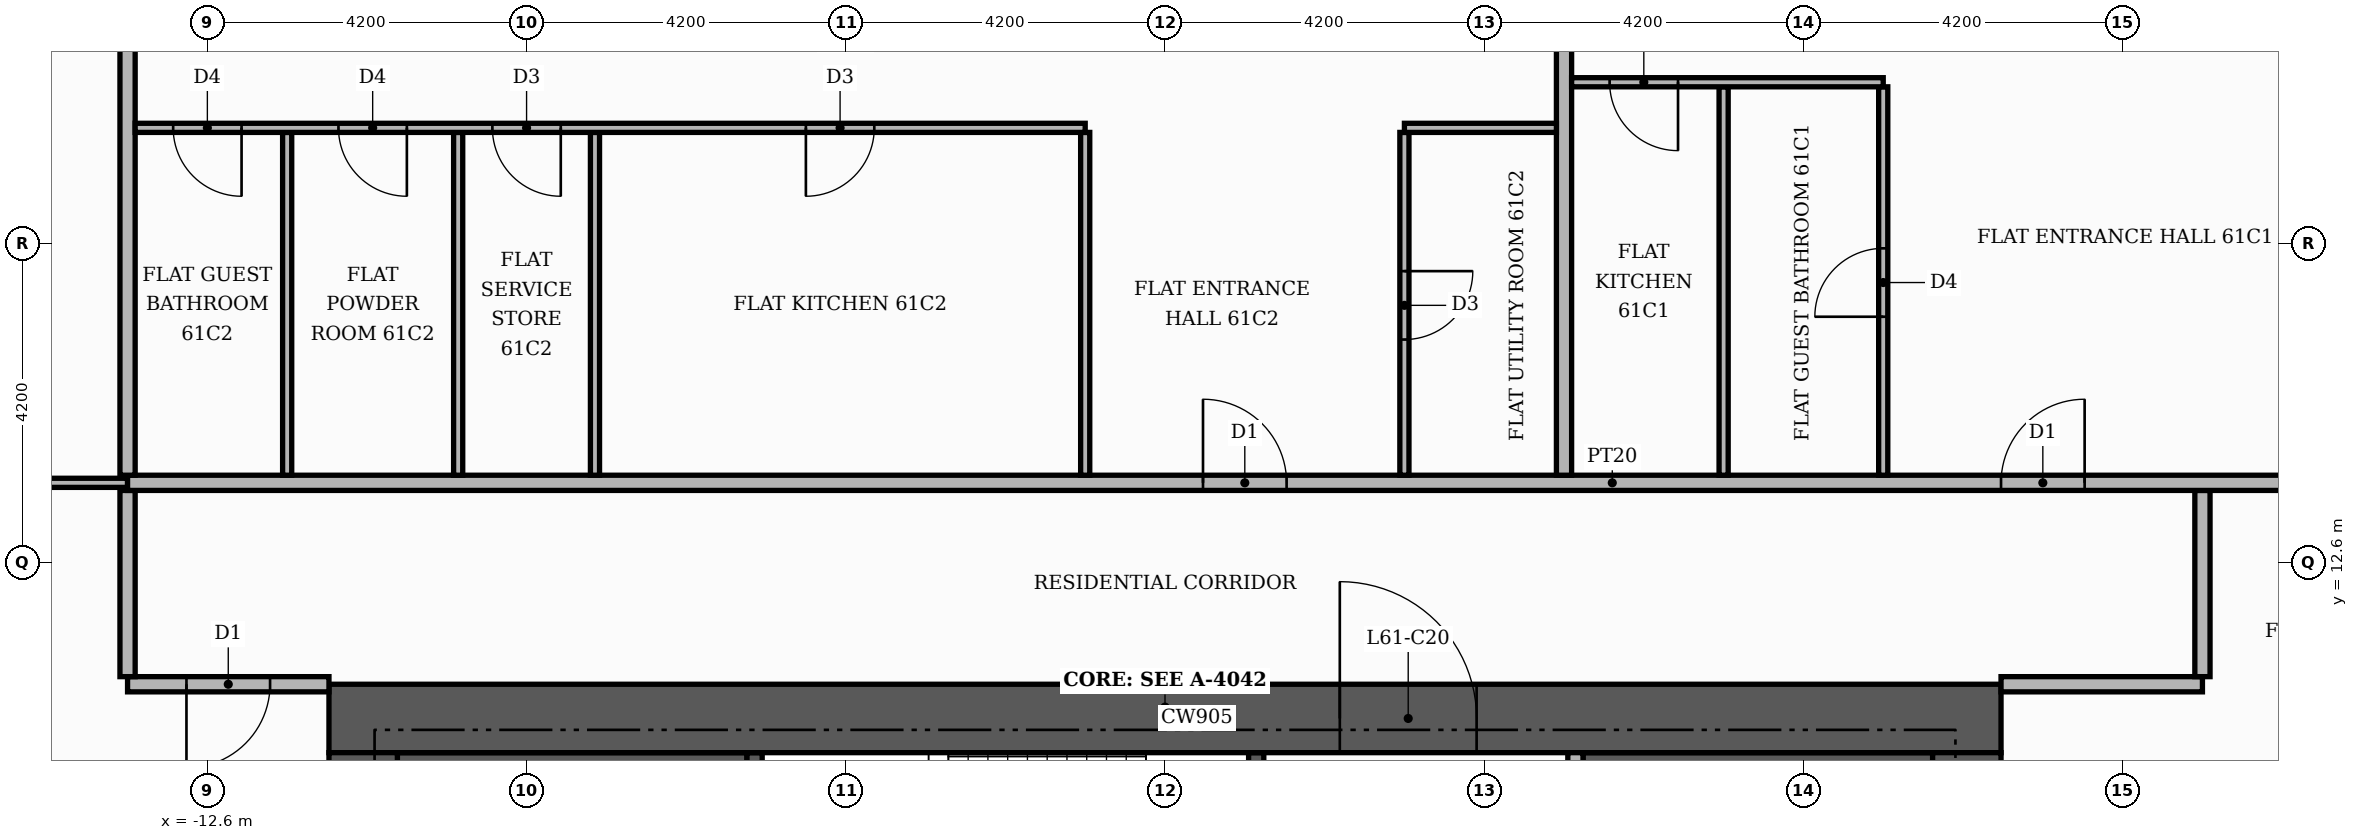
"""IFC4 building model, lengths in metres.
Left out: names, types, materials, properties, quantities, classifications, styles, units other than length and angle.
Written with IfcOpenShell. Run it as: python <this file> out.ifc"""

import sys

from ifc_helpers import new_model, si_unit, direction, frame, frame_2d, origin, place, context, subcontext, project, spatial, rectangle, extrude, element, fill, save


model = new_model("IFC4")
c1 = context("Model", 3, precision=1e-05, world=origin(), true_north=direction((0.0, 1.0)))
c2 = subcontext(c1, "Body", "Model", "MODEL_VIEW")
j1 = project(units=[si_unit("LENGTHUNIT", "METRE"), si_unit("PLANEANGLEUNIT", "RADIAN")], contexts=[c1])
p1 = place(None, origin())
s1 = spatial("IfcSite", under=j1, at=p1, CompositionType="ELEMENT")
p2 = place(p1, origin())
s2 = spatial("IfcBuilding", under=s1, at=p2, CompositionType="ELEMENT")
p3 = place(p2, frame((0.0, 0.0, 256.2)))
s3 = spatial("IfcBuildingStorey", under=s2, at=p3, CompositionType="ELEMENT", Elevation=256.2)
for number, where, z_axis, x_axis in (
    (1, (-10.1, 9.15, 0.0), (0.0, 0.0, 1.0), (1.0, 0.0, 0.0)),
    (2, (5.5, 9.15, 0.0), (0.0, 0.0, 1.0), (1.0, 0.0, 0.0)),
):
    element("IfcWall", number, at=place(p3, frame(where, z_axis=z_axis, x_axis=x_axis)), inside=s3, PredefinedType="SHEAR", context=c2, shape_type="SweptSolid", body=[
        extrude(rectangle(XDim=4.6, YDim=1.9, at=frame_2d((2.3, 0.0))), origin(), (0.0, 0.0, 1.0), 3.48),
    ])
p4 = place(p3, frame((-5.4, 7.25, 0.0), z_axis=(0.0, 0.0, 1.0), x_axis=(0.0, 1.0, 0.0)))
e3 = element("IfcWall", 3, at=p4, inside=s3, PredefinedType="SHEAR", context=c2, shape_type="SweptSolid", body=[
    extrude(rectangle(XDim=2.85, YDim=0.2, at=frame_2d((1.425, 0.0))), origin(), (0.0, 0.0, 1.0), 3.48),
])
p5 = place(p3, frame((1.2, 7.25, 0.0), z_axis=(0.0, 0.0, 1.0), x_axis=(0.0, 1.0, 0.0)))
e4 = element("IfcWall", 4, at=p5, inside=s3, PredefinedType="SHEAR", context=c2, shape_type="SweptSolid", body=[
    extrude(rectangle(XDim=2.85, YDim=0.2, at=frame_2d((1.425, 0.0))), origin(), (0.0, 0.0, 1.0), 3.48),
])
p6 = place(p5, frame((0.85, 0.0, 0.0)))
e5 = element("IfcOpeningElement", 5, at=p6, cuts=e4, PredefinedType="OPENING", context=c2, shape_type="SweptSolid", body=[
    extrude(rectangle(XDim=1.0, YDim=2.1, at=frame_2d((0.5, 1.05))), frame((0.0, 0.11, 0.0), z_axis=(0.0, -1.0, 0.0), x_axis=(1.0, 0.0, 0.0)), (0.0, 0.0, 1.0), 0.22),
])
p7 = place(p3, frame((-11.0, 10.55, 0.0), z_axis=(0.0, 0.0, 1.0), x_axis=(1.0, 0.0, 0.0)))
e6 = element("IfcWall", 6, at=p7, inside=s3, PredefinedType="SHEAR", context=c2, shape_type="SweptSolid", body=[
    extrude(rectangle(XDim=22.0, YDim=0.9, at=frame_2d((11.0, 0.0))), origin(), (0.0, 0.0, 1.0), 3.48),
])
p8 = place(p7, frame((13.3, 0.0, 0.0)))
e7 = element("IfcOpeningElement", 7, at=p8, cuts=e6, PredefinedType="OPENING", context=c2, shape_type="SweptSolid", body=[
    extrude(rectangle(XDim=1.8, YDim=2.2, at=frame_2d((0.9, 1.1))), frame((0.0, 0.46, 0.0), z_axis=(0.0, -1.0, 0.0), x_axis=(1.0, 0.0, 0.0)), (0.0, 0.0, 1.0), 0.92),
])
for number, where, z_axis, x_axis in (
    (8, (-10.55, -10.1, 0.0), (0.0, 0.0, 1.0), (0.0, 1.0, 0.0)),
    (9, (10.55, -10.1, 0.0), (0.0, 0.0, 1.0), (0.0, 1.0, 0.0)),
):
    element("IfcWall", number, at=place(p3, frame(where, z_axis=z_axis, x_axis=x_axis)), inside=s3, PredefinedType="SHEAR", context=c2, shape_type="SweptSolid", body=[
        extrude(rectangle(XDim=20.2, YDim=0.9, at=frame_2d((10.1, 0.0))), origin(), (0.0, 0.0, 1.0), 3.48),
    ])
p9 = place(p3, frame((5.4, 5.5, 0.0), z_axis=(0.0, 0.0, 1.0), x_axis=(0.0, 1.0, 0.0)))
e10 = element("IfcWall", 10, at=p9, inside=s3, PredefinedType="PARTITIONING", context=c2, shape_type="SweptSolid", body=[
    extrude(rectangle(XDim=4.6, YDim=0.2, at=frame_2d((2.3, 0.0))), origin(), (0.0, 0.0, 1.0), 3.48),
])
p10 = place(p9, frame((0.25, 0.0, 0.0)))
e11 = element("IfcOpeningElement", 11, at=p10, cuts=e10, PredefinedType="OPENING", context=c2, shape_type="SweptSolid", body=[
    extrude(rectangle(XDim=1.0, YDim=2.1, at=frame_2d((0.5, 1.05))), frame((0.0, 0.11, 0.0), z_axis=(0.0, -1.0, 0.0), x_axis=(1.0, 0.0, 0.0)), (0.0, 0.0, 1.0), 0.22),
])
p11 = place(p3, frame((-13.65, 11.0, 0.0), z_axis=(0.0, 0.0, 1.0), x_axis=(1.0, 0.0, 0.0)))
e12 = element("IfcWall", 12, at=p11, inside=s3, PredefinedType="PARTITIONING", context=c2, shape_type="SweptSolid", body=[
    extrude(rectangle(XDim=2.65, YDim=0.2, at=frame_2d((1.325, 0.0))), origin(), (0.0, 0.0, 1.0), 3.48),
])
p12 = place(p11, frame((0.775, 0.0, 0.0)))
e13 = element("IfcOpeningElement", 13, at=p12, cuts=e12, PredefinedType="OPENING", context=c2, shape_type="SweptSolid", body=[
    extrude(rectangle(XDim=1.1, YDim=2.4, at=frame_2d((0.55, 1.2))), frame((0.0, 0.11, 0.0), z_axis=(0.0, -1.0, 0.0), x_axis=(1.0, 0.0, 0.0)), (0.0, 0.0, 1.0), 0.22),
])
p13 = place(p3, frame((11.0, 11.0, 0.0), z_axis=(0.0, 0.0, 1.0), x_axis=(1.0, 0.0, 0.0)))
e14 = element("IfcWall", 14, at=p13, inside=s3, PredefinedType="PARTITIONING", context=c2, shape_type="SweptSolid", body=[
    extrude(rectangle(XDim=2.65, YDim=0.2, at=frame_2d((1.325, 0.0))), origin(), (0.0, 0.0, 1.0), 3.48),
])
for number, where, z_axis, x_axis in (
    (15, (-13.65, 11.1, 0.0), (0.0, 0.0, 1.0), (0.0, 1.0, 0.0)),
    (16, (13.65, 11.1, 0.0), (0.0, 0.0, 1.0), (0.0, 1.0, 0.0)),
):
    element("IfcWall", number, at=place(p3, frame(where, z_axis=z_axis, x_axis=x_axis)), inside=s3, PredefinedType="PARTITIONING", context=c2, shape_type="SweptSolid", body=[
        extrude(rectangle(XDim=2.45, YDim=0.2, at=frame_2d((1.225, 0.0))), origin(), (0.0, 0.0, 1.0), 3.48),
    ])
p14 = place(p3, frame((-20.72, 13.65, 0.0), z_axis=(0.0, 0.0, 1.0), x_axis=(1.0, 0.0, 0.0)))
e17 = element("IfcWall", 17, at=p14, inside=s3, PredefinedType="PARTITIONING", context=c2, shape_type="SweptSolid", body=[
    extrude(rectangle(XDim=7.07, YDim=0.12, at=frame_2d((3.535, 0.0))), origin(), (0.0, 0.0, 1.0), 3.48),
])
p15 = place(p14, frame((3.085, 0.0, 0.0)))
e18 = element("IfcOpeningElement", 18, at=p15, cuts=e17, PredefinedType="OPENING", context=c2, shape_type="SweptSolid", body=[
    extrude(rectangle(XDim=0.9, YDim=2.1, at=frame_2d((0.45, 1.05))), frame((0.0, 0.07, 0.0), z_axis=(0.0, -1.0, 0.0), x_axis=(1.0, 0.0, 0.0)), (0.0, 0.0, 1.0), 0.14),
])
p16 = place(p3, frame((-13.65, 13.65, 0.0), z_axis=(0.0, 0.0, 1.0), x_axis=(1.0, 0.0, 0.0)))
e19 = element("IfcWall", 19, at=p16, inside=s3, PredefinedType="PARTITIONING", context=c2, shape_type="SweptSolid", body=[
    extrude(rectangle(XDim=39.07, YDim=0.2, at=frame_2d((19.535, 0.0))), origin(), (0.0, 0.0, 1.0), 3.48),
])
p17 = place(p16, frame((24.65, 0.0, 0.0)))
e20 = element("IfcOpeningElement", 20, at=p17, cuts=e19, PredefinedType="OPENING", context=c2, shape_type="SweptSolid", body=[
    extrude(rectangle(XDim=1.1, YDim=2.4, at=frame_2d((0.55, 1.2))), frame((0.0, 0.11, 0.0), z_axis=(0.0, -1.0, 0.0), x_axis=(1.0, 0.0, 0.0)), (0.0, 0.0, 1.0), 0.22),
])
p18 = place(p16, frame((14.15, 0.0, 0.0)))
e21 = element("IfcOpeningElement", 21, at=p18, cuts=e19, PredefinedType="OPENING", context=c2, shape_type="SweptSolid", body=[
    extrude(rectangle(XDim=1.1, YDim=2.4, at=frame_2d((0.55, 1.2))), frame((0.0, 0.11, 0.0), z_axis=(0.0, -1.0, 0.0), x_axis=(1.0, 0.0, 0.0)), (0.0, 0.0, 1.0), 0.22),
])
p19 = place(p3, frame((-13.65, 13.75, 0.0), z_axis=(0.0, 0.0, 1.0), x_axis=(0.0, 1.0, 0.0)))
e22 = element("IfcWall", 22, at=p19, inside=s3, PredefinedType="PARTITIONING", context=c2, shape_type="SweptSolid", body=[
    extrude(rectangle(XDim=11.67, YDim=0.2, at=frame_2d((5.835, 0.0))), origin(), (0.0, 0.0, 1.0), 3.48),
])
for number, where, z_axis, x_axis in (
    (23, (-11.55, 13.75, 0.0), (0.0, 0.0, 1.0), (0.0, 1.0, 0.0)),
    (24, (-9.3, 13.75, 0.0), (0.0, 0.0, 1.0), (0.0, 1.0, 0.0)),
    (25, (-7.5, 13.75, 0.0), (0.0, 0.0, 1.0), (0.0, 1.0, 0.0)),
    (26, (-1.05, 13.75, 0.0), (0.0, 0.0, 1.0), (0.0, 1.0, 0.0)),
):
    element("IfcWall", number, at=place(p3, frame(where, z_axis=z_axis, x_axis=x_axis)), inside=s3, PredefinedType="PARTITIONING", context=c2, shape_type="SweptSolid", body=[
        extrude(rectangle(XDim=4.51, YDim=0.12, at=frame_2d((2.255, 0.0))), origin(), (0.0, 0.0, 1.0), 3.48),
    ])
p20 = place(p3, frame((3.15, 13.75, 0.0), z_axis=(0.0, 0.0, 1.0), x_axis=(0.0, 1.0, 0.0)))
e27 = element("IfcWall", 27, at=p20, inside=s3, PredefinedType="PARTITIONING", context=c2, shape_type="SweptSolid", body=[
    extrude(rectangle(XDim=4.51, YDim=0.12, at=frame_2d((2.255, 0.0))), origin(), (0.0, 0.0, 1.0), 3.48),
])
p21 = place(p20, frame((1.785, 0.0, 0.0)))
e28 = element("IfcOpeningElement", 28, at=p21, cuts=e27, PredefinedType="OPENING", context=c2, shape_type="SweptSolid", body=[
    extrude(rectangle(XDim=0.9, YDim=2.1, at=frame_2d((0.45, 1.05))), frame((0.0, 0.07, 0.0), z_axis=(0.0, -1.0, 0.0), x_axis=(1.0, 0.0, 0.0)), (0.0, 0.0, 1.0), 0.14),
])
p22 = place(p3, frame((5.25, 13.75, 0.0), z_axis=(0.0, 0.0, 1.0), x_axis=(0.0, 1.0, 0.0)))
e29 = element("IfcWall", 29, at=p22, inside=s3, PredefinedType="PARTITIONING", context=c2, shape_type="SweptSolid", body=[
    extrude(rectangle(XDim=11.67, YDim=0.2, at=frame_2d((5.835, 0.0))), origin(), (0.0, 0.0, 1.0), 3.48),
])
p23 = place(p3, frame((7.35, 13.75, 0.0), z_axis=(0.0, 0.0, 1.0), x_axis=(0.0, 1.0, 0.0)))
e30 = element("IfcWall", 30, at=p23, inside=s3, PredefinedType="PARTITIONING", context=c2, shape_type="SweptSolid", body=[
    extrude(rectangle(XDim=5.11, YDim=0.12, at=frame_2d((2.555, 0.0))), origin(), (0.0, 0.0, 1.0), 3.48),
])
p24 = place(p3, frame((9.45, 13.75, 0.0), z_axis=(0.0, 0.0, 1.0), x_axis=(0.0, 1.0, 0.0)))
e31 = element("IfcWall", 31, at=p24, inside=s3, PredefinedType="PARTITIONING", context=c2, shape_type="SweptSolid", body=[
    extrude(rectangle(XDim=5.11, YDim=0.12, at=frame_2d((2.555, 0.0))), origin(), (0.0, 0.0, 1.0), 3.48),
])
p25 = place(p24, frame((2.085, 0.0, 0.0)))
e32 = element("IfcOpeningElement", 32, at=p25, cuts=e31, PredefinedType="OPENING", context=c2, shape_type="SweptSolid", body=[
    extrude(rectangle(XDim=0.9, YDim=2.1, at=frame_2d((0.45, 1.05))), frame((0.0, 0.07, 0.0), z_axis=(0.0, -1.0, 0.0), x_axis=(1.0, 0.0, 0.0)), (0.0, 0.0, 1.0), 0.14),
])
p26 = place(p3, frame((-13.55, 18.32, 0.0), z_axis=(0.0, 0.0, 1.0), x_axis=(1.0, 0.0, 0.0)))
e33 = element("IfcWall", 33, at=p26, inside=s3, PredefinedType="PARTITIONING", context=c2, shape_type="SweptSolid", body=[
    extrude(rectangle(XDim=12.5, YDim=0.12, at=frame_2d((6.25, 0.0))), origin(), (0.0, 0.0, 1.0), 3.48),
])
p27 = place(p26, frame((8.825, 0.0, 0.0)))
e34 = element("IfcOpeningElement", 34, at=p27, cuts=e33, PredefinedType="OPENING", context=c2, shape_type="SweptSolid", body=[
    extrude(rectangle(XDim=0.9, YDim=2.1, at=frame_2d((0.45, 1.05))), frame((0.0, 0.07, 0.0), z_axis=(0.0, -1.0, 0.0), x_axis=(1.0, 0.0, 0.0)), (0.0, 0.0, 1.0), 0.14),
])
p28 = place(p26, frame((4.7, 0.0, 0.0)))
e35 = element("IfcOpeningElement", 35, at=p28, cuts=e33, PredefinedType="OPENING", context=c2, shape_type="SweptSolid", body=[
    extrude(rectangle(XDim=0.9, YDim=2.1, at=frame_2d((0.45, 1.05))), frame((0.0, 0.07, 0.0), z_axis=(0.0, -1.0, 0.0), x_axis=(1.0, 0.0, 0.0)), (0.0, 0.0, 1.0), 0.14),
])
p29 = place(p26, frame((2.675, 0.0, 0.0)))
e36 = element("IfcOpeningElement", 36, at=p29, cuts=e33, PredefinedType="OPENING", context=c2, shape_type="SweptSolid", body=[
    extrude(rectangle(XDim=0.9, YDim=2.1, at=frame_2d((0.45, 1.05))), frame((0.0, 0.07, 0.0), z_axis=(0.0, -1.0, 0.0), x_axis=(1.0, 0.0, 0.0)), (0.0, 0.0, 1.0), 0.14),
])
p30 = place(p26, frame((0.5, 0.0, 0.0)))
e37 = element("IfcOpeningElement", 37, at=p30, cuts=e33, PredefinedType="OPENING", context=c2, shape_type="SweptSolid", body=[
    extrude(rectangle(XDim=0.9, YDim=2.1, at=frame_2d((0.45, 1.05))), frame((0.0, 0.07, 0.0), z_axis=(0.0, -1.0, 0.0), x_axis=(1.0, 0.0, 0.0)), (0.0, 0.0, 1.0), 0.14),
])
p31 = place(p3, frame((3.15, 18.32, 0.0), z_axis=(0.0, 0.0, 1.0), x_axis=(1.0, 0.0, 0.0)))
e38 = element("IfcWall", 38, at=p31, inside=s3, PredefinedType="PARTITIONING", context=c2, shape_type="SweptSolid", body=[
    extrude(rectangle(XDim=2.0, YDim=0.12, at=frame_2d((1.0, 0.0))), origin(), (0.0, 0.0, 1.0), 3.48),
])
p32 = place(p3, frame((5.35, 18.92, 0.0), z_axis=(0.0, 0.0, 1.0), x_axis=(1.0, 0.0, 0.0)))
e39 = element("IfcWall", 39, at=p32, inside=s3, PredefinedType="PARTITIONING", context=c2, shape_type="SweptSolid", body=[
    extrude(rectangle(XDim=4.1, YDim=0.12, at=frame_2d((2.05, 0.0))), origin(), (0.0, 0.0, 1.0), 3.48),
])
p33 = place(p32, frame((0.5, 0.0, 0.0)))
e40 = element("IfcOpeningElement", 40, at=p33, cuts=e39, PredefinedType="OPENING", context=c2, shape_type="SweptSolid", body=[
    extrude(rectangle(XDim=0.9, YDim=2.1, at=frame_2d((0.45, 1.05))), frame((0.0, 0.07, 0.0), z_axis=(0.0, -1.0, 0.0), x_axis=(1.0, 0.0, 0.0)), (0.0, 0.0, 1.0), 0.14),
])
p34 = place(p8, origin())
e41 = element("IfcDoor", 41, at=p34, inside=s3, OperationType="DOUBLE_DOOR_SINGLE_SWING", PredefinedType="DOOR", context=c2, shape_type="SweptSolid", body=[
    extrude(rectangle(XDim=1.8, YDim=2.2, at=frame_2d((0.9, 1.1))), frame((0.0, 0.025, 0.0), z_axis=(0.0, -1.0, 0.0), x_axis=(1.0, 0.0, 0.0)), (0.0, 0.0, 1.0), 0.05),
])
fill(e7, e41)
p35 = place(p17, origin())
e42 = element("IfcDoor", 42, at=p35, inside=s3, OperationType="SINGLE_SWING_RIGHT", PredefinedType="DOOR", context=c2, shape_type="SweptSolid", body=[
    extrude(rectangle(XDim=1.1, YDim=2.4, at=frame_2d((0.55, 1.2))), frame((0.0, 0.025, 0.0), z_axis=(0.0, -1.0, 0.0), x_axis=(1.0, 0.0, 0.0)), (0.0, 0.0, 1.0), 0.05),
])
fill(e20, e42)
p36 = place(p25, origin())
e43 = element("IfcDoor", 43, at=p36, inside=s3, OperationType="SINGLE_SWING_LEFT", PredefinedType="DOOR", context=c2, shape_type="SweptSolid", body=[
    extrude(rectangle(XDim=0.9, YDim=2.1, at=frame_2d((0.45, 1.05))), frame((0.0, 0.025, 0.0), z_axis=(0.0, -1.0, 0.0), x_axis=(1.0, 0.0, 0.0)), (0.0, 0.0, 1.0), 0.05),
])
fill(e32, e43)
p37 = place(p33, frame((0.9, 0.0, 0.0), z_axis=(0.0, 0.0, 1.0), x_axis=(-1.0, 0.0, 0.0)))
e44 = element("IfcDoor", 44, at=p37, inside=s3, OperationType="SINGLE_SWING_RIGHT", PredefinedType="DOOR", context=c2, shape_type="SweptSolid", body=[
    extrude(rectangle(XDim=0.9, YDim=2.1, at=frame_2d((0.45, 1.05))), frame((0.0, 0.025, 0.0), z_axis=(0.0, -1.0, 0.0), x_axis=(1.0, 0.0, 0.0)), (0.0, 0.0, 1.0), 0.05),
])
fill(e40, e44)
p38 = place(p18, origin())
e45 = element("IfcDoor", 45, at=p38, inside=s3, OperationType="SINGLE_SWING_LEFT", PredefinedType="DOOR", context=c2, shape_type="SweptSolid", body=[
    extrude(rectangle(XDim=1.1, YDim=2.4, at=frame_2d((0.55, 1.2))), frame((0.0, 0.025, 0.0), z_axis=(0.0, -1.0, 0.0), x_axis=(1.0, 0.0, 0.0)), (0.0, 0.0, 1.0), 0.05),
])
fill(e21, e45)
p39 = place(p21, frame((0.9, 0.0, 0.0), z_axis=(0.0, 0.0, 1.0), x_axis=(-1.0, 0.0, 0.0)))
e46 = element("IfcDoor", 46, at=p39, inside=s3, OperationType="SINGLE_SWING_RIGHT", PredefinedType="DOOR", context=c2, shape_type="SweptSolid", body=[
    extrude(rectangle(XDim=0.9, YDim=2.1, at=frame_2d((0.45, 1.05))), frame((0.0, 0.025, 0.0), z_axis=(0.0, -1.0, 0.0), x_axis=(1.0, 0.0, 0.0)), (0.0, 0.0, 1.0), 0.05),
])
fill(e28, e46)
p40 = place(p27, frame((0.9, 0.0, 0.0), z_axis=(0.0, 0.0, 1.0), x_axis=(-1.0, 0.0, 0.0)))
e47 = element("IfcDoor", 47, at=p40, inside=s3, OperationType="SINGLE_SWING_LEFT", PredefinedType="DOOR", context=c2, shape_type="SweptSolid", body=[
    extrude(rectangle(XDim=0.9, YDim=2.1, at=frame_2d((0.45, 1.05))), frame((0.0, 0.025, 0.0), z_axis=(0.0, -1.0, 0.0), x_axis=(1.0, 0.0, 0.0)), (0.0, 0.0, 1.0), 0.05),
])
fill(e34, e47)
p41 = place(p28, frame((0.9, 0.0, 0.0), z_axis=(0.0, 0.0, 1.0), x_axis=(-1.0, 0.0, 0.0)))
e48 = element("IfcDoor", 48, at=p41, inside=s3, OperationType="SINGLE_SWING_RIGHT", PredefinedType="DOOR", context=c2, shape_type="SweptSolid", body=[
    extrude(rectangle(XDim=0.9, YDim=2.1, at=frame_2d((0.45, 1.05))), frame((0.0, 0.025, 0.0), z_axis=(0.0, -1.0, 0.0), x_axis=(1.0, 0.0, 0.0)), (0.0, 0.0, 1.0), 0.05),
])
fill(e35, e48)
p42 = place(p29, frame((0.9, 0.0, 0.0), z_axis=(0.0, 0.0, 1.0), x_axis=(-1.0, 0.0, 0.0)))
e49 = element("IfcDoor", 49, at=p42, inside=s3, OperationType="SINGLE_SWING_RIGHT", PredefinedType="DOOR", context=c2, shape_type="SweptSolid", body=[
    extrude(rectangle(XDim=0.9, YDim=2.1, at=frame_2d((0.45, 1.05))), frame((0.0, 0.025, 0.0), z_axis=(0.0, -1.0, 0.0), x_axis=(1.0, 0.0, 0.0)), (0.0, 0.0, 1.0), 0.05),
])
fill(e36, e49)
p43 = place(p30, frame((0.9, 0.0, 0.0), z_axis=(0.0, 0.0, 1.0), x_axis=(-1.0, 0.0, 0.0)))
e50 = element("IfcDoor", 50, at=p43, inside=s3, OperationType="SINGLE_SWING_RIGHT", PredefinedType="DOOR", context=c2, shape_type="SweptSolid", body=[
    extrude(rectangle(XDim=0.9, YDim=2.1, at=frame_2d((0.45, 1.05))), frame((0.0, 0.025, 0.0), z_axis=(0.0, -1.0, 0.0), x_axis=(1.0, 0.0, 0.0)), (0.0, 0.0, 1.0), 0.05),
])
fill(e37, e50)
p44 = place(p12, frame((1.1, 0.0, 0.0), z_axis=(0.0, 0.0, 1.0), x_axis=(-1.0, 0.0, 0.0)))
e51 = element("IfcDoor", 51, at=p44, inside=s3, OperationType="SINGLE_SWING_LEFT", PredefinedType="DOOR", context=c2, shape_type="SweptSolid", body=[
    extrude(rectangle(XDim=1.1, YDim=2.4, at=frame_2d((0.55, 1.2))), frame((0.0, 0.025, 0.0), z_axis=(0.0, -1.0, 0.0), x_axis=(1.0, 0.0, 0.0)), (0.0, 0.0, 1.0), 0.05),
])
fill(e13, e51)
save(model, sys.argv[1])
